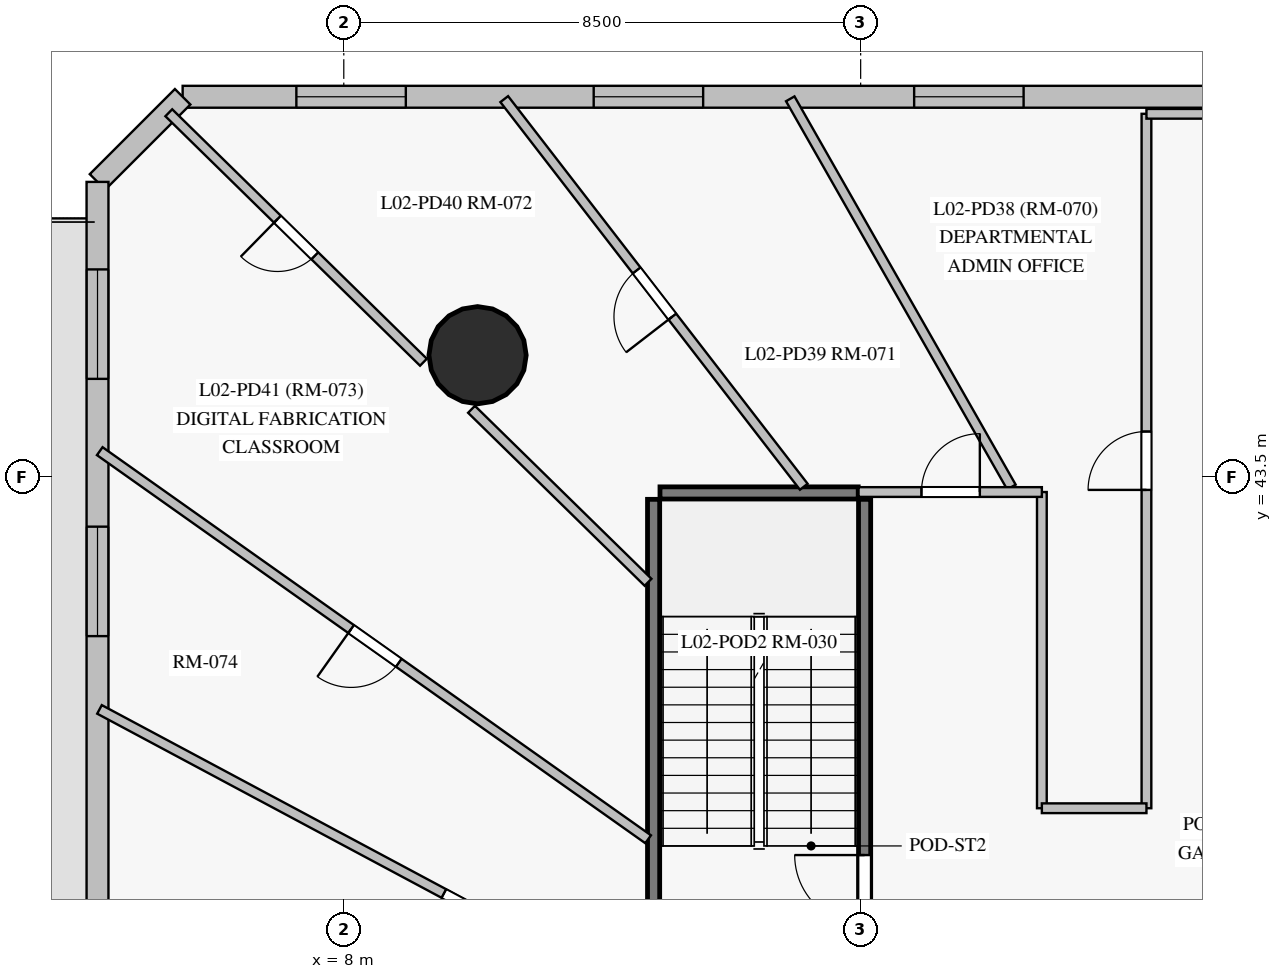
"""IFC4 building model, lengths in metres.
Left out: names, types, materials, properties, quantities, classifications, styles, units other than length and angle.
Written with IfcOpenShell. Run it as: python <this file> out.ifc"""

import sys

from ifc_helpers import new_model, si_unit, direction, frame, frame_2d, origin, origin_with_axes, origin_2d, place, context, subcontext, project, spatial, rectangle, circle, extrude, source, transform, mapped, element, fill, save


model = new_model("IFC4")
c1 = context("Model", 3, precision=1e-05, world=origin(), true_north=direction((0.0, 1.0)))
c2 = subcontext(c1, "Body", "Model", "MODEL_VIEW")
j1 = project(units=[si_unit("LENGTHUNIT", "METRE"), si_unit("PLANEANGLEUNIT", "RADIAN")], contexts=[c1])
p1 = place(None, origin())
s1 = spatial("IfcSite", under=j1, at=p1, CompositionType="ELEMENT")
p2 = place(p1, origin())
s2 = spatial("IfcBuilding", under=s1, at=p2, CompositionType="ELEMENT")
p3 = place(p2, frame((0.0, 0.0, 9.0)))
s3 = spatial("IfcBuildingStorey", under=s2, at=p3, CompositionType="ELEMENT", Elevation=9.0)
m1 = source(origin_with_axes(), c2, "Body", "SweptSolid", [
    extrude(circle(Radius=0.8, at=origin_2d()), origin(), (0.0, 0.0, 1.0), 4.5),
])
p4 = place(p3, frame((10.2, 45.5, 0.0), z_axis=(0.0, 0.0, 1.0), x_axis=(1.0, 0.0, 0.0)))
e1 = element("IfcColumn", 1, at=p4, inside=s3, PredefinedType="COLUMN", context=c2, shape_type="MappedRepresentation", body=[
    mapped(m1, transform((0.0, 0.0, 0.0), scale=1.0)),
])
p5 = place(p3, frame((54.6, 49.75, 0.0), z_axis=(0.0, 0.0, 1.0), x_axis=(-1.0, 0.0, 0.0)))
e2 = element("IfcWall", 2, at=p5, inside=s3, PredefinedType="SOLIDWALL", context=c2, shape_type="SweptSolid", body=[
    extrude(rectangle(XDim=49.25, YDim=0.36, at=frame_2d((24.625, 0.0))), origin(), (0.0, 0.0, 1.0), 4.2),
])
p6 = place(p5, frame((1.866, 0.0, 0.85)))
e3 = element("IfcOpeningElement", 3, at=p6, cuts=e2, PredefinedType="OPENING", context=c2, shape_type="SweptSolid", body=[
    extrude(rectangle(XDim=1.8, YDim=2.2, at=frame_2d((0.9, 1.1))), frame((0.0, 0.19, 0.0), z_axis=(0.0, -1.0, 0.0), x_axis=(1.0, 0.0, 0.0)), (0.0, 0.0, 1.0), 0.38),
])
p7 = place(p5, frame((6.763, 0.0, 0.85)))
e4 = element("IfcOpeningElement", 4, at=p7, cuts=e2, PredefinedType="OPENING", context=c2, shape_type="SweptSolid", body=[
    extrude(rectangle(XDim=1.8, YDim=2.2, at=frame_2d((0.9, 1.1))), frame((0.0, 0.19, 0.0), z_axis=(0.0, -1.0, 0.0), x_axis=(1.0, 0.0, 0.0)), (0.0, 0.0, 1.0), 0.38),
])
p8 = place(p5, frame((11.474, 0.0, 0.85)))
e5 = element("IfcOpeningElement", 5, at=p8, cuts=e2, PredefinedType="OPENING", context=c2, shape_type="SweptSolid", body=[
    extrude(rectangle(XDim=1.8, YDim=2.2, at=frame_2d((0.9, 1.1))), frame((0.0, 0.19, 0.0), z_axis=(0.0, -1.0, 0.0), x_axis=(1.0, 0.0, 0.0)), (0.0, 0.0, 1.0), 0.38),
])
p9 = place(p5, frame((16.083, 0.0, 0.85)))
e6 = element("IfcOpeningElement", 6, at=p9, cuts=e2, PredefinedType="OPENING", context=c2, shape_type="SweptSolid", body=[
    extrude(rectangle(XDim=1.8, YDim=2.2, at=frame_2d((0.9, 1.1))), frame((0.0, 0.19, 0.0), z_axis=(0.0, -1.0, 0.0), x_axis=(1.0, 0.0, 0.0)), (0.0, 0.0, 1.0), 0.38),
])
p10 = place(p5, frame((20.595, 0.0, 0.85)))
e7 = element("IfcOpeningElement", 7, at=p10, cuts=e2, PredefinedType="OPENING", context=c2, shape_type="SweptSolid", body=[
    extrude(rectangle(XDim=1.8, YDim=2.2, at=frame_2d((0.9, 1.1))), frame((0.0, 0.19, 0.0), z_axis=(0.0, -1.0, 0.0), x_axis=(1.0, 0.0, 0.0)), (0.0, 0.0, 1.0), 0.38),
])
p11 = place(p5, frame((24.23, 0.0, 0.85)))
e8 = element("IfcOpeningElement", 8, at=p11, cuts=e2, PredefinedType="OPENING", context=c2, shape_type="SweptSolid", body=[
    extrude(rectangle(XDim=1.8, YDim=2.2, at=frame_2d((0.9, 1.1))), frame((0.0, 0.19, 0.0), z_axis=(0.0, -1.0, 0.0), x_axis=(1.0, 0.0, 0.0)), (0.0, 0.0, 1.0), 0.38),
])
p12 = place(p5, frame((30.4, 0.0, 0.85)))
e9 = element("IfcOpeningElement", 9, at=p12, cuts=e2, PredefinedType="OPENING", context=c2, shape_type="SweptSolid", body=[
    extrude(rectangle(XDim=1.8, YDim=2.2, at=frame_2d((0.9, 1.1))), frame((0.0, 0.19, 0.0), z_axis=(0.0, -1.0, 0.0), x_axis=(1.0, 0.0, 0.0)), (0.0, 0.0, 1.0), 0.38),
])
p13 = place(p5, frame((35.42, 0.0, 0.85)))
e10 = element("IfcOpeningElement", 10, at=p13, cuts=e2, PredefinedType="OPENING", context=c2, shape_type="SweptSolid", body=[
    extrude(rectangle(XDim=1.8, YDim=2.2, at=frame_2d((0.9, 1.1))), frame((0.0, 0.19, 0.0), z_axis=(0.0, -1.0, 0.0), x_axis=(1.0, 0.0, 0.0)), (0.0, 0.0, 1.0), 0.38),
])
p14 = place(p5, frame((40.69, 0.0, 0.85)))
e11 = element("IfcOpeningElement", 11, at=p14, cuts=e2, PredefinedType="OPENING", context=c2, shape_type="SweptSolid", body=[
    extrude(rectangle(XDim=1.8, YDim=2.2, at=frame_2d((0.9, 1.1))), frame((0.0, 0.19, 0.0), z_axis=(0.0, -1.0, 0.0), x_axis=(1.0, 0.0, 0.0)), (0.0, 0.0, 1.0), 0.38),
])
p15 = place(p5, frame((45.58, 0.0, 0.85)))
e12 = element("IfcOpeningElement", 12, at=p15, cuts=e2, PredefinedType="OPENING", context=c2, shape_type="SweptSolid", body=[
    extrude(rectangle(XDim=1.8, YDim=2.2, at=frame_2d((0.9, 1.1))), frame((0.0, 0.19, 0.0), z_axis=(0.0, -1.0, 0.0), x_axis=(1.0, 0.0, 0.0)), (0.0, 0.0, 1.0), 0.38),
])
p16 = place(p3, frame((5.35, 49.75, 0.0), z_axis=(0.0, 0.0, 1.0), x_axis=(-0.707168432242, -0.707045124756, 0.0)))
e13 = element("IfcWall", 13, at=p16, inside=s3, PredefinedType="SOLIDWALL", context=c2, shape_type="SweptSolid", body=[
    extrude(rectangle(XDim=1.98, YDim=0.36, at=frame_2d((0.99, 0.0))), origin(), (0.0, 0.0, 1.0), 4.2),
])
p17 = place(p3, frame((3.95, 48.35, 0.0), z_axis=(0.0, 0.0, 1.0), x_axis=(0.0, -1.0, 0.0)))
e14 = element("IfcWall", 14, at=p17, inside=s3, PredefinedType="SOLIDWALL", context=c2, shape_type="SweptSolid", body=[
    extrude(rectangle(XDim=43.7, YDim=0.36, at=frame_2d((21.85, 0.0))), origin(), (0.0, 0.0, 1.0), 4.2),
])
p18 = place(p17, frame((1.439, 0.0, 0.85)))
e15 = element("IfcOpeningElement", 15, at=p18, cuts=e14, PredefinedType="OPENING", context=c2, shape_type="SweptSolid", body=[
    extrude(rectangle(XDim=1.8, YDim=2.2, at=frame_2d((0.9, 1.1))), frame((0.0, 0.19, 0.0), z_axis=(0.0, -1.0, 0.0), x_axis=(1.0, 0.0, 0.0)), (0.0, 0.0, 1.0), 0.38),
])
p19 = place(p17, frame((5.669, 0.0, 0.85)))
e16 = element("IfcOpeningElement", 16, at=p19, cuts=e14, PredefinedType="OPENING", context=c2, shape_type="SweptSolid", body=[
    extrude(rectangle(XDim=1.8, YDim=2.2, at=frame_2d((0.9, 1.1))), frame((0.0, 0.19, 0.0), z_axis=(0.0, -1.0, 0.0), x_axis=(1.0, 0.0, 0.0)), (0.0, 0.0, 1.0), 0.38),
])
p20 = place(p17, frame((15.485, 0.0, 0.85)))
e17 = element("IfcOpeningElement", 17, at=p20, cuts=e14, PredefinedType="OPENING", context=c2, shape_type="SweptSolid", body=[
    extrude(rectangle(XDim=1.8, YDim=2.2, at=frame_2d((0.9, 1.1))), frame((0.0, 0.19, 0.0), z_axis=(0.0, -1.0, 0.0), x_axis=(1.0, 0.0, 0.0)), (0.0, 0.0, 1.0), 0.38),
])
p21 = place(p17, frame((20.96, 0.0, 0.85)))
e18 = element("IfcOpeningElement", 18, at=p21, cuts=e14, PredefinedType="OPENING", context=c2, shape_type="SweptSolid", body=[
    extrude(rectangle(XDim=1.8, YDim=2.2, at=frame_2d((0.9, 1.1))), frame((0.0, 0.19, 0.0), z_axis=(0.0, -1.0, 0.0), x_axis=(1.0, 0.0, 0.0)), (0.0, 0.0, 1.0), 0.38),
])
p22 = place(p17, frame((28.012, 0.0, 0.85)))
e19 = element("IfcOpeningElement", 19, at=p22, cuts=e14, PredefinedType="OPENING", context=c2, shape_type="SweptSolid", body=[
    extrude(rectangle(XDim=1.8, YDim=2.2, at=frame_2d((0.9, 1.1))), frame((0.0, 0.19, 0.0), z_axis=(0.0, -1.0, 0.0), x_axis=(1.0, 0.0, 0.0)), (0.0, 0.0, 1.0), 0.38),
])
p23 = place(p17, frame((32.279, 0.0, 0.85)))
e20 = element("IfcOpeningElement", 20, at=p23, cuts=e14, PredefinedType="OPENING", context=c2, shape_type="SweptSolid", body=[
    extrude(rectangle(XDim=1.8, YDim=2.2, at=frame_2d((0.9, 1.1))), frame((0.0, 0.19, 0.0), z_axis=(0.0, -1.0, 0.0), x_axis=(1.0, 0.0, 0.0)), (0.0, 0.0, 1.0), 0.38),
])
p24 = place(p17, frame((37.578, 0.0, 0.85)))
e21 = element("IfcOpeningElement", 21, at=p24, cuts=e14, PredefinedType="OPENING", context=c2, shape_type="SweptSolid", body=[
    extrude(rectangle(XDim=1.8, YDim=2.2, at=frame_2d((0.9, 1.1))), frame((0.0, 0.19, 0.0), z_axis=(0.0, -1.0, 0.0), x_axis=(1.0, 0.0, 0.0)), (0.0, 0.0, 1.0), 0.38),
])
p25 = place(p17, frame((12.221, 0.0, 0.0)))
e22 = element("IfcOpeningElement", 22, at=p25, cuts=e14, PredefinedType="OPENING", context=c2, shape_type="SweptSolid", body=[
    extrude(rectangle(XDim=1.05, YDim=2.12, at=frame_2d((0.525, 1.06))), frame((0.0, 0.19, 0.0), z_axis=(0.0, -1.0, 0.0), x_axis=(1.0, 0.0, 0.0)), (0.0, 0.0, 1.0), 0.38),
])
p26 = place(p3, frame((13.095, 35.78, 0.0), z_axis=(0.0, 0.0, 1.0), x_axis=(0.0, 1.0, 0.0)))
e23 = element("IfcWall", 23, at=p26, inside=s3, PredefinedType="SHEAR", context=c2, shape_type="SweptSolid", body=[
    extrude(rectangle(XDim=7.35, YDim=0.2, at=frame_2d((3.675, 0.0))), origin(), (0.0, 0.0, 1.0), 4.2),
])
p27 = place(p3, frame((16.565, 35.78, 0.0), z_axis=(0.0, 0.0, 1.0), x_axis=(0.0, 1.0, 0.0)))
e24 = element("IfcWall", 24, at=p27, inside=s3, PredefinedType="SHEAR", context=c2, shape_type="SweptSolid", body=[
    extrude(rectangle(XDim=7.35, YDim=0.2, at=frame_2d((3.675, 0.0))), origin(), (0.0, 0.0, 1.0), 4.2),
])
p28 = place(p27, frame((0.35, 0.0, 0.0)))
e25 = element("IfcOpeningElement", 25, at=p28, cuts=e24, PredefinedType="OPENING", context=c2, shape_type="SweptSolid", body=[
    extrude(rectangle(XDim=1.15, YDim=2.15, at=frame_2d((0.575, 1.075))), frame((0.0, 0.11, 0.0), z_axis=(0.0, -1.0, 0.0), x_axis=(1.0, 0.0, 0.0)), (0.0, 0.0, 1.0), 0.22),
])
p29 = place(p3, frame((13.2, 43.235, 0.0), z_axis=(0.0, 0.0, 1.0), x_axis=(1.0, 0.0, 0.0)))
e26 = element("IfcWall", 26, at=p29, inside=s3, PredefinedType="SHEAR", context=c2, shape_type="SweptSolid", body=[
    extrude(rectangle(XDim=3.26, YDim=0.2, at=frame_2d((1.63, 0.0))), origin(), (0.0, 0.0, 1.0), 4.2),
])
p30 = place(p3, frame((16.068, 33.214, 0.0), z_axis=(0.0, 0.0, 1.0), x_axis=(-0.881886972295, 0.471460887132, 0.0)))
e27 = element("IfcWall", 27, at=p30, inside=s3, PredefinedType="PARTITIONING", context=c2, shape_type="SweptSolid", body=[
    extrude(rectangle(XDim=13.704, YDim=0.16, at=frame_2d((6.852, 0.0))), origin(), (0.0, 0.0, 1.0), 4.2),
])
p31 = place(p30, frame((6.422, 0.0, 0.0)))
e28 = element("IfcOpeningElement", 28, at=p31, cuts=e27, PredefinedType="OPENING", context=c2, shape_type="SweptSolid", body=[
    extrude(rectangle(XDim=0.86, YDim=2.04, at=frame_2d((0.43, 1.02))), frame((0.0, 0.09, 0.0), z_axis=(0.0, -1.0, 0.0), x_axis=(1.0, 0.0, 0.0)), (0.0, 0.0, 1.0), 0.18),
])
p32 = place(p3, frame((21.2, 38.05, 0.0), z_axis=(0.0, 0.0, 1.0), x_axis=(0.0, 1.0, 0.0)))
e29 = element("IfcWall", 29, at=p32, inside=s3, PredefinedType="PARTITIONING", context=c2, shape_type="SweptSolid", body=[
    extrude(rectangle(XDim=11.42, YDim=0.16, at=frame_2d((5.71, 0.0))), origin(), (0.0, 0.0, 1.0), 4.2),
])
p33 = place(p32, frame((5.235, 0.0, 0.0)))
e30 = element("IfcOpeningElement", 30, at=p33, cuts=e29, PredefinedType="OPENING", context=c2, shape_type="SweptSolid", body=[
    extrude(rectangle(XDim=0.96, YDim=2.15, at=frame_2d((0.48, 1.075))), frame((0.0, 0.09, 0.0), z_axis=(0.0, -1.0, 0.0), x_axis=(1.0, 0.0, 0.0)), (0.0, 0.0, 1.0), 0.18),
])
p34 = place(p3, frame((13.005, 37.54, 0.0), z_axis=(0.0, 0.0, 1.0), x_axis=(-0.816255020813, 0.577691735269, 0.0)))
e31 = element("IfcWall", 31, at=p34, inside=s3, PredefinedType="PARTITIONING", context=c2, shape_type="SweptSolid", body=[
    extrude(rectangle(XDim=11.048, YDim=0.16, at=frame_2d((5.524, 0.0))), origin(), (0.0, 0.0, 1.0), 4.2),
])
p35 = place(p34, frame((5.024, 0.0, 0.0)))
e32 = element("IfcOpeningElement", 32, at=p35, cuts=e31, PredefinedType="OPENING", context=c2, shape_type="SweptSolid", body=[
    extrude(rectangle(XDim=0.96, YDim=2.15, at=frame_2d((0.48, 1.075))), frame((0.0, 0.09, 0.0), z_axis=(0.0, -1.0, 0.0), x_axis=(1.0, 0.0, 0.0)), (0.0, 0.0, 1.0), 0.18),
])
p36 = place(p3, frame((15.565, 43.337, 0.0), z_axis=(0.0, 0.0, 1.0), x_axis=(-0.611449226112, 0.791283668407, 0.0)))
e33 = element("IfcWall", 33, at=p36, inside=s3, PredefinedType="PARTITIONING", context=c2, shape_type="SweptSolid", body=[
    extrude(rectangle(XDim=8.056, YDim=0.16, at=frame_2d((4.028, 0.0))), origin(), (0.0, 0.0, 1.0), 4.2),
])
p37 = place(p36, frame((3.535, 0.0, 0.0)))
e34 = element("IfcOpeningElement", 34, at=p37, cuts=e33, PredefinedType="OPENING", context=c2, shape_type="SweptSolid", body=[
    extrude(rectangle(XDim=0.96, YDim=2.15, at=frame_2d((0.48, 1.075))), frame((0.0, 0.09, 0.0), z_axis=(0.0, -1.0, 0.0), x_axis=(1.0, 0.0, 0.0)), (0.0, 0.0, 1.0), 0.18),
])
p38 = place(p3, frame((18.979, 43.332, 0.0), z_axis=(0.0, 0.0, 1.0), x_axis=(-0.495000650274, 0.868892603391, 0.0)))
e35 = element("IfcWall", 35, at=p38, inside=s3, PredefinedType="PARTITIONING", context=c2, shape_type="SweptSolid", body=[
    extrude(rectangle(XDim=7.348, YDim=0.16, at=frame_2d((3.674, 0.0))), origin(), (0.0, 0.0, 1.0), 4.2),
])
p39 = place(p3, frame((9.31, 45.385, 0.0), z_axis=(0.0, 0.0, 1.0), x_axis=(-0.714336488375, 0.699802387375, 0.0)))
e36 = element("IfcWall", 36, at=p39, inside=s3, PredefinedType="PARTITIONING", context=c2, shape_type="SweptSolid", body=[
    extrude(rectangle(XDim=5.862, YDim=0.16, at=frame_2d((2.931, 0.0))), origin(), (0.0, 0.0, 1.0), 4.2),
])
p40 = place(p39, frame((2.501, 0.0, 0.0)))
e37 = element("IfcOpeningElement", 37, at=p40, cuts=e36, PredefinedType="OPENING", context=c2, shape_type="SweptSolid", body=[
    extrude(rectangle(XDim=0.86, YDim=2.04, at=frame_2d((0.43, 1.02))), frame((0.0, 0.09, 0.0), z_axis=(0.0, -1.0, 0.0), x_axis=(1.0, 0.0, 0.0)), (0.0, 0.0, 1.0), 0.18),
])
p41 = place(p3, frame((19.48, 43.25, 0.0), z_axis=(0.0, 0.0, 1.0), x_axis=(0.0, -1.0, 0.0)))
e38 = element("IfcWall", 38, at=p41, inside=s3, PredefinedType="PARTITIONING", context=c2, shape_type="SweptSolid", body=[
    extrude(rectangle(XDim=5.2, YDim=0.16, at=frame_2d((2.6, 0.0))), origin(), (0.0, 0.0, 1.0), 4.2),
])
p42 = place(p3, frame((21.2, 49.47, 0.0), z_axis=(0.0, 0.0, 1.0), x_axis=(1.0, 0.0, 0.0)))
e39 = element("IfcWall", 39, at=p42, inside=s3, PredefinedType="PARTITIONING", context=c2, shape_type="SweptSolid", body=[
    extrude(rectangle(XDim=4.2, YDim=0.16, at=frame_2d((2.1, 0.0))), origin(), (0.0, 0.0, 1.0), 4.2),
])
p43 = place(p3, frame((13.004, 41.766, 0.0), z_axis=(0.0, 0.0, 1.0), x_axis=(-0.714278297669, 0.699861781696, 0.0)))
e40 = element("IfcWall", 40, at=p43, inside=s3, PredefinedType="PARTITIONING", context=c2, shape_type="SweptSolid", body=[
    extrude(rectangle(XDim=4.064, YDim=0.16, at=frame_2d((2.032, 0.0))), origin(), (0.0, 0.0, 1.0), 4.2),
])
p44 = place(p3, frame((16.465, 43.25, 0.0), z_axis=(0.0, 0.0, 1.0), x_axis=(1.0, 0.0, 0.0)))
e41 = element("IfcWall", 41, at=p44, inside=s3, PredefinedType="PARTITIONING", context=c2, shape_type="SweptSolid", body=[
    extrude(rectangle(XDim=3.015, YDim=0.16, at=frame_2d((1.507, 0.0))), origin(), (0.0, 0.0, 1.0), 4.2),
])
p45 = place(p44, frame((1.035, 0.0, 0.0)))
e42 = element("IfcOpeningElement", 42, at=p45, cuts=e41, PredefinedType="OPENING", context=c2, shape_type="SweptSolid", body=[
    extrude(rectangle(XDim=0.96, YDim=2.15, at=frame_2d((0.48, 1.075))), frame((0.0, 0.09, 0.0), z_axis=(0.0, -1.0, 0.0), x_axis=(1.0, 0.0, 0.0)), (0.0, 0.0, 1.0), 0.18),
])
p46 = place(p3, frame((19.48, 38.05, 0.0), z_axis=(0.0, 0.0, 1.0), x_axis=(1.0, 0.0, 0.0)))
e43 = element("IfcWall", 43, at=p46, inside=s3, PredefinedType="PARTITIONING", context=c2, shape_type="SweptSolid", body=[
    extrude(rectangle(XDim=1.72, YDim=0.16, at=frame_2d((0.86, 0.0))), origin(), (0.0, 0.0, 1.0), 4.2),
])
m2 = source(origin_with_axes(), c2, "Body", "SweptSolid", [
    extrude(rectangle(XDim=1.8, YDim=2.2, at=frame_2d((0.9, 1.1))), frame((0.0, 0.03, 0.0), z_axis=(0.0, -1.0, 0.0), x_axis=(1.0, 0.0, 0.0)), (0.0, 0.0, 1.0), 0.06),
])
p47 = place(p13, origin())
e44 = element("IfcWindow", 44, at=p47, inside=s3, PartitioningType="SINGLE_PANEL", PredefinedType="WINDOW", context=c2, shape_type="MappedRepresentation", body=[
    mapped(m2, transform((0.0, 0.0, 0.0), scale=1.0)),
])
fill(e10, e44)
p48 = place(p14, origin())
e45 = element("IfcWindow", 45, at=p48, inside=s3, PartitioningType="SINGLE_PANEL", PredefinedType="WINDOW", context=c2, shape_type="MappedRepresentation", body=[
    mapped(m2, transform((0.0, 0.0, 0.0), scale=1.0)),
])
fill(e11, e45)
p49 = place(p15, origin())
e46 = element("IfcWindow", 46, at=p49, inside=s3, PartitioningType="SINGLE_PANEL", PredefinedType="WINDOW", context=c2, shape_type="MappedRepresentation", body=[
    mapped(m2, transform((0.0, 0.0, 0.0), scale=1.0)),
])
fill(e12, e46)
p50 = place(p18, origin())
e47 = element("IfcWindow", 47, at=p50, inside=s3, PartitioningType="SINGLE_PANEL", PredefinedType="WINDOW", context=c2, shape_type="MappedRepresentation", body=[
    mapped(m2, transform((0.0, 0.0, 0.0), scale=1.0)),
])
fill(e15, e47)
p51 = place(p19, origin())
e48 = element("IfcWindow", 48, at=p51, inside=s3, PartitioningType="SINGLE_PANEL", PredefinedType="WINDOW", context=c2, shape_type="MappedRepresentation", body=[
    mapped(m2, transform((0.0, 0.0, 0.0), scale=1.0)),
])
fill(e16, e48)
m3 = source(origin_with_axes(), c2, "Body", "SweptSolid", [
    extrude(rectangle(XDim=1.15, YDim=2.15, at=frame_2d((0.575, 1.075))), frame((0.0, 0.025, 0.0), z_axis=(0.0, -1.0, 0.0), x_axis=(1.0, 0.0, 0.0)), (0.0, 0.0, 1.0), 0.05),
])
p52 = place(p28, origin())
e49 = element("IfcDoor", 49, at=p52, inside=s3, OperationType="SINGLE_SWING_RIGHT", PredefinedType="DOOR", context=c2, shape_type="MappedRepresentation", body=[
    mapped(m3, transform((0.0, 0.0, 0.0), scale=1.0)),
])
fill(e25, e49)
m4 = source(origin_with_axes(), c2, "Body", "SweptSolid", [
    extrude(rectangle(XDim=0.96, YDim=2.15, at=frame_2d((0.48, 1.075))), frame((0.0, 0.025, 0.0), z_axis=(0.0, -1.0, 0.0), x_axis=(1.0, 0.0, 0.0)), (0.0, 0.0, 1.0), 0.05),
])
p53 = place(p33, origin())
e50 = element("IfcDoor", 50, at=p53, inside=s3, OperationType="SINGLE_SWING_LEFT", PredefinedType="DOOR", context=c2, shape_type="MappedRepresentation", body=[
    mapped(m4, transform((0.0, 0.0, 0.0), scale=1.0)),
])
fill(e30, e50)
p54 = place(p45, origin())
e51 = element("IfcDoor", 51, at=p54, inside=s3, OperationType="SINGLE_SWING_RIGHT", PredefinedType="DOOR", context=c2, shape_type="MappedRepresentation", body=[
    mapped(m4, transform((0.0, 0.0, 0.0), scale=1.0)),
])
fill(e42, e51)
p55 = place(p37, origin())
e52 = element("IfcDoor", 52, at=p55, inside=s3, OperationType="SINGLE_SWING_LEFT", PredefinedType="DOOR", context=c2, shape_type="MappedRepresentation", body=[
    mapped(m4, transform((0.0, 0.0, 0.0), scale=1.0)),
])
fill(e34, e52)
p56 = place(p35, origin())
e53 = element("IfcDoor", 53, at=p56, inside=s3, OperationType="SINGLE_SWING_RIGHT", PredefinedType="DOOR", context=c2, shape_type="MappedRepresentation", body=[
    mapped(m4, transform((0.0, 0.0, 0.0), scale=1.0)),
])
fill(e32, e53)
m5 = source(origin_with_axes(), c2, "Body", "SweptSolid", [
    extrude(rectangle(XDim=0.86, YDim=2.04, at=frame_2d((0.43, 1.02))), frame((0.0, 0.025, 0.0), z_axis=(0.0, -1.0, 0.0), x_axis=(1.0, 0.0, 0.0)), (0.0, 0.0, 1.0), 0.05),
])
p57 = place(p40, origin())
e54 = element("IfcDoor", 54, at=p57, inside=s3, OperationType="SINGLE_SWING_RIGHT", PredefinedType="DOOR", context=c2, shape_type="MappedRepresentation", body=[
    mapped(m5, transform((0.0, 0.0, 0.0), scale=1.0)),
])
fill(e37, e54)
p58 = place(p31, origin())
e55 = element("IfcDoor", 55, at=p58, inside=s3, OperationType="SINGLE_SWING_LEFT", PredefinedType="DOOR", context=c2, shape_type="MappedRepresentation", body=[
    mapped(m5, transform((0.0, 0.0, 0.0), scale=1.0)),
])
fill(e28, e55)
save(model, sys.argv[1])
